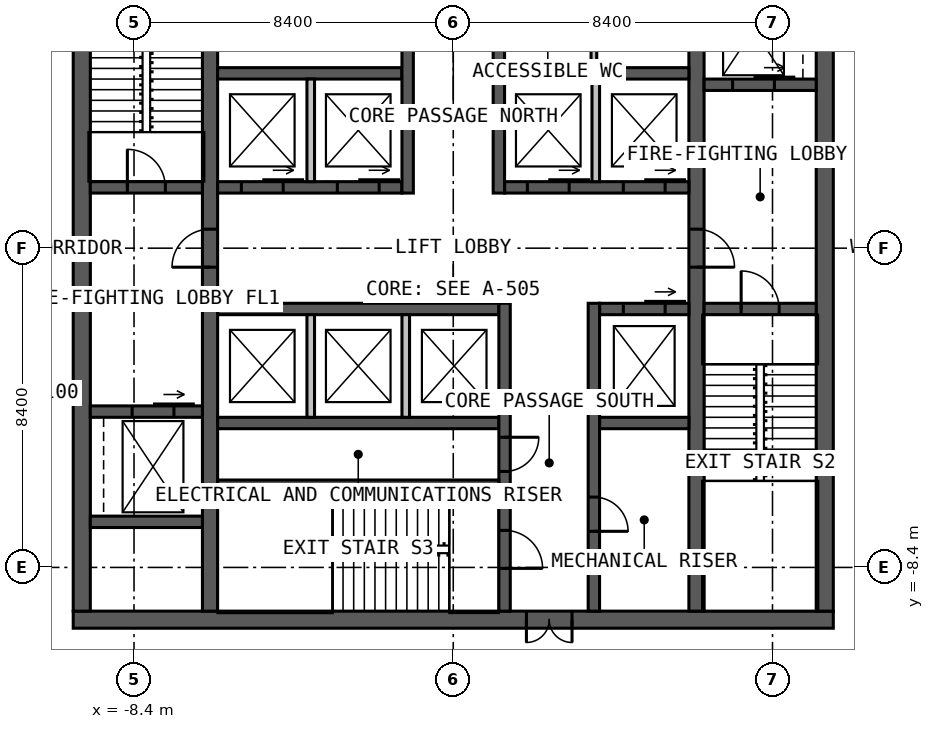
"""IFC4 building model, lengths in metres.
Left out: names, types, materials, properties, quantities, classifications, styles, units other than length and angle.
Written with IfcOpenShell. Run it as: python <this file> out.ifc"""

import sys

from ifc_helpers import new_model, si_unit, direction, frame, frame_2d, origin, place, context, subcontext, project, spatial, rectangle, extrude, element, fill, save


model = new_model("IFC4")
c1 = context("Model", 3, precision=1e-05, world=origin(), true_north=direction((0.0, 1.0)))
c2 = subcontext(c1, "Body", "Model", "MODEL_VIEW")
j1 = project(units=[si_unit("LENGTHUNIT", "METRE"), si_unit("PLANEANGLEUNIT", "RADIAN")], contexts=[c1])
p1 = place(None, origin())
s1 = spatial("IfcSite", under=j1, at=p1, CompositionType="ELEMENT")
p2 = place(p1, origin())
s2 = spatial("IfcBuilding", under=s1, at=p2, CompositionType="ELEMENT")
p3 = place(p2, frame((0.0, 0.0, 175.0)))
s3 = spatial("IfcBuildingStorey", under=s2, at=p3, CompositionType="ELEMENT", Elevation=175.0)
p4 = place(p3, frame((10.0, -9.775, 0.0), z_axis=(0.0, 0.0, 1.0), x_axis=(-1.0, 0.0, 0.0)))
e1 = element("IfcWall", 1, at=p4, inside=s3, PredefinedType="SOLIDWALL", context=c2, shape_type="SweptSolid", body=[
    extrude(rectangle(XDim=20.0, YDim=0.45, at=frame_2d((10.0, 0.0))), origin(), (0.0, 0.0, 1.0), 4.0),
])
p5 = place(p4, frame((6.875, 0.0, 0.0)))
e2 = element("IfcOpeningElement", 2, at=p5, cuts=e1, PredefinedType="OPENING", context=c2, shape_type="SweptSolid", body=[
    extrude(rectangle(XDim=1.2, YDim=2.2, at=frame_2d((0.6, 1.1))), frame((0.0, 0.235, 0.0), z_axis=(0.0, -1.0, 0.0), x_axis=(1.0, 0.0, 0.0)), (0.0, 0.0, 1.0), 0.47),
])
for number, where, z_axis, x_axis in (
    (3, (9.775, -9.55, 0.0), (0.0, 0.0, 1.0), (0.0, 1.0, 0.0)),
    (4, (-9.775, 9.55, 0.0), (0.0, 0.0, 1.0), (0.0, -1.0, 0.0)),
):
    element("IfcWall", number, at=place(p3, frame(where, z_axis=z_axis, x_axis=x_axis)), inside=s3, PredefinedType="SOLIDWALL", context=c2, shape_type="SweptSolid", body=[
        extrude(rectangle(XDim=19.1, YDim=0.45, at=frame_2d((9.55, 0.0))), origin(), (0.0, 0.0, 1.0), 4.0),
    ])
p6 = place(p3, frame((-6.4, -9.55, 0.0), z_axis=(0.0, 0.0, 1.0), x_axis=(0.0, 1.0, 0.0)))
e5 = element("IfcWall", 5, at=p6, inside=s3, PredefinedType="SOLIDWALL", context=c2, shape_type="SweptSolid", body=[
    extrude(rectangle(XDim=19.1, YDim=0.4, at=frame_2d((9.55, 0.0))), origin(), (0.0, 0.0, 1.0), 4.0),
])
p7 = place(p6, frame((9.05, 0.0, 0.0)))
e6 = element("IfcOpeningElement", 6, at=p7, cuts=e5, PredefinedType="OPENING", context=c2, shape_type="SweptSolid", body=[
    extrude(rectangle(XDim=1.0, YDim=2.2, at=frame_2d((0.5, 1.1))), frame((0.0, 0.21, 0.0), z_axis=(0.0, -1.0, 0.0), x_axis=(1.0, 0.0, 0.0)), (0.0, 0.0, 1.0), 0.42),
])
p8 = place(p3, frame((6.4, 9.55, 0.0), z_axis=(0.0, 0.0, 1.0), x_axis=(0.0, -1.0, 0.0)))
e7 = element("IfcWall", 7, at=p8, inside=s3, PredefinedType="SOLIDWALL", context=c2, shape_type="SweptSolid", body=[
    extrude(rectangle(XDim=19.1, YDim=0.4, at=frame_2d((9.55, 0.0))), origin(), (0.0, 0.0, 1.0), 4.0),
])
p9 = place(p8, frame((9.05, 0.0, 0.0)))
e8 = element("IfcOpeningElement", 8, at=p9, cuts=e7, PredefinedType="OPENING", context=c2, shape_type="SweptSolid", body=[
    extrude(rectangle(XDim=1.0, YDim=2.2, at=frame_2d((0.5, 1.1))), frame((0.0, 0.21, 0.0), z_axis=(0.0, -1.0, 0.0), x_axis=(1.0, 0.0, 0.0)), (0.0, 0.0, 1.0), 0.42),
])
p10 = place(p3, frame((-6.2, 1.6, 0.0), z_axis=(0.0, 0.0, 1.0), x_axis=(1.0, 0.0, 0.0)))
e9 = element("IfcWall", 9, at=p10, inside=s3, PredefinedType="SOLIDWALL", context=c2, shape_type="SweptSolid", body=[
    extrude(rectangle(XDim=4.85, YDim=0.3, at=frame_2d((2.425, 0.0))), origin(), (0.0, 0.0, 1.0), 4.0),
])
p11 = place(p10, frame((0.625, 0.0, 0.0)))
e10 = element("IfcOpeningElement", 10, at=p11, cuts=e9, PredefinedType="OPENING", context=c2, shape_type="SweptSolid", body=[
    extrude(rectangle(XDim=1.1, YDim=2.2, at=frame_2d((0.55, 1.1))), frame((0.0, 0.16, 0.0), z_axis=(0.0, -1.0, 0.0), x_axis=(1.0, 0.0, 0.0)), (0.0, 0.0, 1.0), 0.32),
])
p12 = place(p10, frame((3.15, 0.0, 0.0)))
e11 = element("IfcOpeningElement", 11, at=p12, cuts=e9, PredefinedType="OPENING", context=c2, shape_type="SweptSolid", body=[
    extrude(rectangle(XDim=1.1, YDim=2.2, at=frame_2d((0.55, 1.1))), frame((0.0, 0.16, 0.0), z_axis=(0.0, -1.0, 0.0), x_axis=(1.0, 0.0, 0.0)), (0.0, 0.0, 1.0), 0.32),
])
p13 = place(p3, frame((1.35, 1.6, 0.0), z_axis=(0.0, 0.0, 1.0), x_axis=(1.0, 0.0, 0.0)))
e12 = element("IfcWall", 12, at=p13, inside=s3, PredefinedType="SOLIDWALL", context=c2, shape_type="SweptSolid", body=[
    extrude(rectangle(XDim=4.85, YDim=0.3, at=frame_2d((2.425, 0.0))), origin(), (0.0, 0.0, 1.0), 4.0),
])
p14 = place(p13, frame((0.6, 0.0, 0.0)))
e13 = element("IfcOpeningElement", 13, at=p14, cuts=e12, PredefinedType="OPENING", context=c2, shape_type="SweptSolid", body=[
    extrude(rectangle(XDim=1.1, YDim=2.2, at=frame_2d((0.55, 1.1))), frame((0.0, 0.16, 0.0), z_axis=(0.0, -1.0, 0.0), x_axis=(1.0, 0.0, 0.0)), (0.0, 0.0, 1.0), 0.32),
])
p15 = place(p13, frame((3.125, 0.0, 0.0)))
e14 = element("IfcOpeningElement", 14, at=p15, cuts=e12, PredefinedType="OPENING", context=c2, shape_type="SweptSolid", body=[
    extrude(rectangle(XDim=1.1, YDim=2.2, at=frame_2d((0.55, 1.1))), frame((0.0, 0.16, 0.0), z_axis=(0.0, -1.0, 0.0), x_axis=(1.0, 0.0, 0.0)), (0.0, 0.0, 1.0), 0.32),
])
for number, where, z_axis, x_axis in (
    (15, (-6.2, 4.6, 0.0), (0.0, 0.0, 1.0), (1.0, 0.0, 0.0)),
    (16, (1.35, 4.6, 0.0), (0.0, 0.0, 1.0), (1.0, 0.0, 0.0)),
):
    element("IfcWall", number, at=place(p3, frame(where, z_axis=z_axis, x_axis=x_axis)), inside=s3, PredefinedType="SOLIDWALL", context=c2, shape_type="SweptSolid", body=[
        extrude(rectangle(XDim=4.85, YDim=0.3, at=frame_2d((2.425, 0.0))), origin(), (0.0, 0.0, 1.0), 4.0),
    ])
p16 = place(p3, frame((-1.2, 1.45, 0.0), z_axis=(0.0, 0.0, 1.0), x_axis=(0.0, 1.0, 0.0)))
e17 = element("IfcWall", 17, at=p16, inside=s3, PredefinedType="SOLIDWALL", context=c2, shape_type="SweptSolid", body=[
    extrude(rectangle(XDim=8.1, YDim=0.3, at=frame_2d((4.05, 0.0))), origin(), (0.0, 0.0, 1.0), 4.0),
])
p17 = place(p16, frame((5.05, 0.0, 0.0)))
e18 = element("IfcOpeningElement", 18, at=p17, cuts=e17, PredefinedType="OPENING", context=c2, shape_type="SweptSolid", body=[
    extrude(rectangle(XDim=1.0, YDim=2.2, at=frame_2d((0.5, 1.1))), frame((0.0, 0.16, 0.0), z_axis=(0.0, -1.0, 0.0), x_axis=(1.0, 0.0, 0.0)), (0.0, 0.0, 1.0), 0.32),
])
p18 = place(p3, frame((1.2, 1.45, 0.0), z_axis=(0.0, 0.0, 1.0), x_axis=(0.0, 1.0, 0.0)))
e19 = element("IfcWall", 19, at=p18, inside=s3, PredefinedType="SOLIDWALL", context=c2, shape_type="SweptSolid", body=[
    extrude(rectangle(XDim=8.1, YDim=0.3, at=frame_2d((4.05, 0.0))), origin(), (0.0, 0.0, 1.0), 4.0),
])
p19 = place(p18, frame((3.8, 0.0, 0.0)))
e20 = element("IfcOpeningElement", 20, at=p19, cuts=e19, PredefinedType="OPENING", context=c2, shape_type="SweptSolid", body=[
    extrude(rectangle(XDim=1.0, YDim=2.2, at=frame_2d((0.5, 1.1))), frame((0.0, 0.16, 0.0), z_axis=(0.0, -1.0, 0.0), x_axis=(1.0, 0.0, 0.0)), (0.0, 0.0, 1.0), 0.32),
])
p20 = place(p18, frame((6.15, 0.0, 0.0)))
e21 = element("IfcOpeningElement", 21, at=p20, cuts=e19, PredefinedType="OPENING", context=c2, shape_type="SweptSolid", body=[
    extrude(rectangle(XDim=1.0, YDim=2.2, at=frame_2d((0.5, 1.1))), frame((0.0, 0.16, 0.0), z_axis=(0.0, -1.0, 0.0), x_axis=(1.0, 0.0, 0.0)), (0.0, 0.0, 1.0), 0.32),
])
p21 = place(p3, frame((-6.2, -1.6, 0.0), z_axis=(0.0, 0.0, 1.0), x_axis=(1.0, 0.0, 0.0)))
e22 = element("IfcWall", 22, at=p21, inside=s3, PredefinedType="SOLIDWALL", context=c2, shape_type="SweptSolid", body=[
    extrude(rectangle(XDim=7.4, YDim=0.3, at=frame_2d((3.7, 0.0))), origin(), (0.0, 0.0, 1.0), 4.0),
])
p22 = place(p3, frame((3.85, -1.6, 0.0), z_axis=(0.0, 0.0, 1.0), x_axis=(1.0, 0.0, 0.0)))
e23 = element("IfcWall", 23, at=p22, inside=s3, PredefinedType="SOLIDWALL", context=c2, shape_type="SweptSolid", body=[
    extrude(rectangle(XDim=2.35, YDim=0.3, at=frame_2d((1.175, 0.0))), origin(), (0.0, 0.0, 1.0), 4.0),
])
p23 = place(p22, frame((0.625, 0.0, 0.0)))
e24 = element("IfcOpeningElement", 24, at=p23, cuts=e23, PredefinedType="OPENING", context=c2, shape_type="SweptSolid", body=[
    extrude(rectangle(XDim=1.1, YDim=2.2, at=frame_2d((0.55, 1.1))), frame((0.0, 0.16, 0.0), z_axis=(0.0, -1.0, 0.0), x_axis=(1.0, 0.0, 0.0)), (0.0, 0.0, 1.0), 0.32),
])
p24 = place(p3, frame((-6.2, -4.6, 0.0), z_axis=(0.0, 0.0, 1.0), x_axis=(1.0, 0.0, 0.0)))
e25 = element("IfcWall", 25, at=p24, inside=s3, PredefinedType="SOLIDWALL", context=c2, shape_type="SweptSolid", body=[
    extrude(rectangle(XDim=7.4, YDim=0.3, at=frame_2d((3.7, 0.0))), origin(), (0.0, 0.0, 1.0), 4.0),
])
p25 = place(p3, frame((3.85, -4.6, 0.0), z_axis=(0.0, 0.0, 1.0), x_axis=(1.0, 0.0, 0.0)))
e26 = element("IfcWall", 26, at=p25, inside=s3, PredefinedType="SOLIDWALL", context=c2, shape_type="SweptSolid", body=[
    extrude(rectangle(XDim=2.35, YDim=0.3, at=frame_2d((1.175, 0.0))), origin(), (0.0, 0.0, 1.0), 4.0),
])
p26 = place(p3, frame((1.35, -1.45, 0.0), z_axis=(0.0, 0.0, 1.0), x_axis=(0.0, -1.0, 0.0)))
e27 = element("IfcWall", 27, at=p26, inside=s3, PredefinedType="SOLIDWALL", context=c2, shape_type="SweptSolid", body=[
    extrude(rectangle(XDim=8.1, YDim=0.3, at=frame_2d((4.05, 0.0))), origin(), (0.0, 0.0, 1.0), 4.0),
])
p27 = place(p26, frame((5.975, 0.0, 0.0)))
e28 = element("IfcOpeningElement", 28, at=p27, cuts=e27, PredefinedType="OPENING", context=c2, shape_type="SweptSolid", body=[
    extrude(rectangle(XDim=1.0, YDim=2.2, at=frame_2d((0.5, 1.1))), frame((0.0, 0.16, 0.0), z_axis=(0.0, -1.0, 0.0), x_axis=(1.0, 0.0, 0.0)), (0.0, 0.0, 1.0), 0.32),
])
p28 = place(p26, frame((3.525, 0.0, 0.0)))
e29 = element("IfcOpeningElement", 29, at=p28, cuts=e27, PredefinedType="OPENING", context=c2, shape_type="SweptSolid", body=[
    extrude(rectangle(XDim=0.9, YDim=2.2, at=frame_2d((0.45, 1.1))), frame((0.0, 0.16, 0.0), z_axis=(0.0, -1.0, 0.0), x_axis=(1.0, 0.0, 0.0)), (0.0, 0.0, 1.0), 0.32),
])
p29 = place(p3, frame((3.7, -1.45, 0.0), z_axis=(0.0, 0.0, 1.0), x_axis=(0.0, -1.0, 0.0)))
e30 = element("IfcWall", 30, at=p29, inside=s3, PredefinedType="SOLIDWALL", context=c2, shape_type="SweptSolid", body=[
    extrude(rectangle(XDim=8.1, YDim=0.3, at=frame_2d((4.05, 0.0))), origin(), (0.0, 0.0, 1.0), 4.0),
])
p30 = place(p29, frame((5.1, 0.0, 0.0)))
e31 = element("IfcOpeningElement", 31, at=p30, cuts=e30, PredefinedType="OPENING", context=c2, shape_type="SweptSolid", body=[
    extrude(rectangle(XDim=0.9, YDim=2.2, at=frame_2d((0.45, 1.1))), frame((0.0, 0.16, 0.0), z_axis=(0.0, -1.0, 0.0), x_axis=(1.0, 0.0, 0.0)), (0.0, 0.0, 1.0), 0.32),
])
p31 = place(p3, frame((-6.2, -6.2, 0.0), z_axis=(0.0, 0.0, 1.0), x_axis=(1.0, 0.0, 0.0)))
e32 = element("IfcWall", 32, at=p31, inside=s3, PredefinedType="SOLIDWALL", context=c2, shape_type="SweptSolid", body=[
    extrude(rectangle(XDim=7.4, YDim=0.2, at=frame_2d((3.7, 0.0))), origin(), (0.0, 0.0, 1.0), 4.0),
])
p32 = place(p3, frame((-9.55, 1.6, 0.0), z_axis=(0.0, 0.0, 1.0), x_axis=(1.0, 0.0, 0.0)))
e33 = element("IfcWall", 33, at=p32, inside=s3, PredefinedType="SOLIDWALL", context=c2, shape_type="SweptSolid", body=[
    extrude(rectangle(XDim=2.95, YDim=0.3, at=frame_2d((1.475, 0.0))), origin(), (0.0, 0.0, 1.0), 4.0),
])
p33 = place(p32, frame((0.975, 0.0, 0.0)))
e34 = element("IfcOpeningElement", 34, at=p33, cuts=e33, PredefinedType="OPENING", context=c2, shape_type="SweptSolid", body=[
    extrude(rectangle(XDim=1.0, YDim=2.2, at=frame_2d((0.5, 1.1))), frame((0.0, 0.16, 0.0), z_axis=(0.0, -1.0, 0.0), x_axis=(1.0, 0.0, 0.0)), (0.0, 0.0, 1.0), 0.32),
])
p34 = place(p3, frame((6.6, -1.6, 0.0), z_axis=(0.0, 0.0, 1.0), x_axis=(1.0, 0.0, 0.0)))
e35 = element("IfcWall", 35, at=p34, inside=s3, PredefinedType="SOLIDWALL", context=c2, shape_type="SweptSolid", body=[
    extrude(rectangle(XDim=2.95, YDim=0.3, at=frame_2d((1.475, 0.0))), origin(), (0.0, 0.0, 1.0), 4.0),
])
p35 = place(p34, frame((0.975, 0.0, 0.0)))
e36 = element("IfcOpeningElement", 36, at=p35, cuts=e35, PredefinedType="OPENING", context=c2, shape_type="SweptSolid", body=[
    extrude(rectangle(XDim=1.0, YDim=2.2, at=frame_2d((0.5, 1.1))), frame((0.0, 0.16, 0.0), z_axis=(0.0, -1.0, 0.0), x_axis=(1.0, 0.0, 0.0)), (0.0, 0.0, 1.0), 0.32),
])
p36 = place(p3, frame((-9.55, -4.3, 0.0), z_axis=(0.0, 0.0, 1.0), x_axis=(1.0, 0.0, 0.0)))
e37 = element("IfcWall", 37, at=p36, inside=s3, PredefinedType="SOLIDWALL", context=c2, shape_type="SweptSolid", body=[
    extrude(rectangle(XDim=2.95, YDim=0.3, at=frame_2d((1.475, 0.0))), origin(), (0.0, 0.0, 1.0), 4.0),
])
p37 = place(p36, frame((1.1, 0.0, 0.0)))
e38 = element("IfcOpeningElement", 38, at=p37, cuts=e37, PredefinedType="OPENING", context=c2, shape_type="SweptSolid", body=[
    extrude(rectangle(XDim=1.1, YDim=2.2, at=frame_2d((0.55, 1.1))), frame((0.0, 0.16, 0.0), z_axis=(0.0, -1.0, 0.0), x_axis=(1.0, 0.0, 0.0)), (0.0, 0.0, 1.0), 0.32),
])
p38 = place(p3, frame((6.6, 4.3, 0.0), z_axis=(0.0, 0.0, 1.0), x_axis=(1.0, 0.0, 0.0)))
e39 = element("IfcWall", 39, at=p38, inside=s3, PredefinedType="SOLIDWALL", context=c2, shape_type="SweptSolid", body=[
    extrude(rectangle(XDim=2.95, YDim=0.3, at=frame_2d((1.475, 0.0))), origin(), (0.0, 0.0, 1.0), 4.0),
])
p39 = place(p38, frame((0.75, 0.0, 0.0)))
e40 = element("IfcOpeningElement", 40, at=p39, cuts=e39, PredefinedType="OPENING", context=c2, shape_type="SweptSolid", body=[
    extrude(rectangle(XDim=1.1, YDim=2.2, at=frame_2d((0.55, 1.1))), frame((0.0, 0.16, 0.0), z_axis=(0.0, -1.0, 0.0), x_axis=(1.0, 0.0, 0.0)), (0.0, 0.0, 1.0), 0.32),
])
p40 = place(p3, frame((-9.55, -7.2, 0.0), z_axis=(0.0, 0.0, 1.0), x_axis=(1.0, 0.0, 0.0)))
e41 = element("IfcWall", 41, at=p40, inside=s3, PredefinedType="SOLIDWALL", context=c2, shape_type="SweptSolid", body=[
    extrude(rectangle(XDim=2.95, YDim=0.3, at=frame_2d((1.475, 0.0))), origin(), (0.0, 0.0, 1.0), 4.0),
])
for number, where, z_axis, x_axis in (
    (42, (-3.75, 1.75, 0.0), (0.0, 0.0, 1.0), (0.0, 1.0, 0.0)),
    (43, (3.75, 1.75, 0.0), (0.0, 0.0, 1.0), (0.0, 1.0, 0.0)),
    (44, (-3.75, -1.75, 0.0), (0.0, 0.0, 1.0), (0.0, -1.0, 0.0)),
    (45, (-1.25, -1.75, 0.0), (0.0, 0.0, 1.0), (0.0, -1.0, 0.0)),
):
    element("IfcWall", number, at=place(p3, frame(where, z_axis=z_axis, x_axis=x_axis)), inside=s3, PredefinedType="SOLIDWALL", context=c2, shape_type="SweptSolid", body=[
        extrude(rectangle(XDim=2.7, YDim=0.2, at=frame_2d((1.35, 0.0))), origin(), (0.0, 0.0, 1.0), 3.75),
    ])
p41 = place(p3, frame((3.7, 4.75, 0.0), z_axis=(0.0, 0.0, 1.0), x_axis=(0.0, 1.0, 0.0)))
e46 = element("IfcWall", 46, at=p41, inside=s3, PredefinedType="PARTITIONING", context=c2, shape_type="SweptSolid", body=[
    extrude(rectangle(XDim=1.975, YDim=0.15, at=frame_2d((0.988, 0.0))), origin(), (0.0, 0.0, 1.0), 3.75),
])
p42 = place(p5, origin())
e47 = element("IfcDoor", 47, at=p42, inside=s3, OperationType="DOUBLE_DOOR_SINGLE_SWING", PredefinedType="DOOR", context=c2, shape_type="SweptSolid", body=[
    extrude(rectangle(XDim=1.2, YDim=2.2, at=frame_2d((0.6, 1.1))), frame((0.0, 0.025, 0.0), z_axis=(0.0, -1.0, 0.0), x_axis=(1.0, 0.0, 0.0)), (0.0, 0.0, 1.0), 0.05),
])
fill(e2, e47)
p43 = place(p7, origin())
e48 = element("IfcDoor", 48, at=p43, inside=s3, OperationType="SINGLE_SWING_LEFT", PredefinedType="DOOR", context=c2, shape_type="SweptSolid", body=[
    extrude(rectangle(XDim=1.0, YDim=2.2, at=frame_2d((0.5, 1.1))), frame((0.0, 0.025, 0.0), z_axis=(0.0, -1.0, 0.0), x_axis=(1.0, 0.0, 0.0)), (0.0, 0.0, 1.0), 0.05),
])
fill(e6, e48)
p44 = place(p9, origin())
e49 = element("IfcDoor", 49, at=p44, inside=s3, OperationType="SINGLE_SWING_RIGHT", PredefinedType="DOOR", context=c2, shape_type="SweptSolid", body=[
    extrude(rectangle(XDim=1.0, YDim=2.2, at=frame_2d((0.5, 1.1))), frame((0.0, 0.025, 0.0), z_axis=(0.0, -1.0, 0.0), x_axis=(1.0, 0.0, 0.0)), (0.0, 0.0, 1.0), 0.05),
])
fill(e8, e49)
p45 = place(p33, origin())
e50 = element("IfcDoor", 50, at=p45, inside=s3, OperationType="SINGLE_SWING_LEFT", PredefinedType="DOOR", context=c2, shape_type="SweptSolid", body=[
    extrude(rectangle(XDim=1.0, YDim=2.2, at=frame_2d((0.5, 1.1))), frame((0.0, 0.025, 0.0), z_axis=(0.0, -1.0, 0.0), x_axis=(1.0, 0.0, 0.0)), (0.0, 0.0, 1.0), 0.05),
])
fill(e34, e50)
p46 = place(p35, origin())
e51 = element("IfcDoor", 51, at=p46, inside=s3, OperationType="SINGLE_SWING_LEFT", PredefinedType="DOOR", context=c2, shape_type="SweptSolid", body=[
    extrude(rectangle(XDim=1.0, YDim=2.2, at=frame_2d((0.5, 1.1))), frame((0.0, 0.025, 0.0), z_axis=(0.0, -1.0, 0.0), x_axis=(1.0, 0.0, 0.0)), (0.0, 0.0, 1.0), 0.05),
])
fill(e36, e51)
p47 = place(p27, origin())
e52 = element("IfcDoor", 52, at=p47, inside=s3, OperationType="SINGLE_SWING_RIGHT", PredefinedType="DOOR", context=c2, shape_type="SweptSolid", body=[
    extrude(rectangle(XDim=1.0, YDim=2.2, at=frame_2d((0.5, 1.1))), frame((0.0, 0.025, 0.0), z_axis=(0.0, -1.0, 0.0), x_axis=(1.0, 0.0, 0.0)), (0.0, 0.0, 1.0), 0.05),
])
fill(e28, e52)
p48 = place(p28, origin())
e53 = element("IfcDoor", 53, at=p48, inside=s3, OperationType="SINGLE_SWING_LEFT", PredefinedType="DOOR", context=c2, shape_type="SweptSolid", body=[
    extrude(rectangle(XDim=0.9, YDim=2.2, at=frame_2d((0.45, 1.1))), frame((0.0, 0.025, 0.0), z_axis=(0.0, -1.0, 0.0), x_axis=(1.0, 0.0, 0.0)), (0.0, 0.0, 1.0), 0.05),
])
fill(e29, e53)
p49 = place(p30, origin())
e54 = element("IfcDoor", 54, at=p49, inside=s3, OperationType="SINGLE_SWING_RIGHT", PredefinedType="DOOR", context=c2, shape_type="SweptSolid", body=[
    extrude(rectangle(XDim=0.9, YDim=2.2, at=frame_2d((0.45, 1.1))), frame((0.0, 0.025, 0.0), z_axis=(0.0, -1.0, 0.0), x_axis=(1.0, 0.0, 0.0)), (0.0, 0.0, 1.0), 0.05),
])
fill(e31, e54)
p50 = place(p11, origin())
e55 = element("IfcDoor", 55, at=p50, inside=s3, OperationType="SLIDING_TO_LEFT", PredefinedType="DOOR", context=c2, shape_type="SweptSolid", body=[
    extrude(rectangle(XDim=1.1, YDim=2.2, at=frame_2d((0.55, 1.1))), frame((0.0, 0.025, 0.0), z_axis=(0.0, -1.0, 0.0), x_axis=(1.0, 0.0, 0.0)), (0.0, 0.0, 1.0), 0.05),
])
fill(e10, e55)
p51 = place(p12, origin())
e56 = element("IfcDoor", 56, at=p51, inside=s3, OperationType="SLIDING_TO_LEFT", PredefinedType="DOOR", context=c2, shape_type="SweptSolid", body=[
    extrude(rectangle(XDim=1.1, YDim=2.2, at=frame_2d((0.55, 1.1))), frame((0.0, 0.025, 0.0), z_axis=(0.0, -1.0, 0.0), x_axis=(1.0, 0.0, 0.0)), (0.0, 0.0, 1.0), 0.05),
])
fill(e11, e56)
p52 = place(p14, origin())
e57 = element("IfcDoor", 57, at=p52, inside=s3, OperationType="SLIDING_TO_LEFT", PredefinedType="DOOR", context=c2, shape_type="SweptSolid", body=[
    extrude(rectangle(XDim=1.1, YDim=2.2, at=frame_2d((0.55, 1.1))), frame((0.0, 0.025, 0.0), z_axis=(0.0, -1.0, 0.0), x_axis=(1.0, 0.0, 0.0)), (0.0, 0.0, 1.0), 0.05),
])
fill(e13, e57)
p53 = place(p15, origin())
e58 = element("IfcDoor", 58, at=p53, inside=s3, OperationType="SLIDING_TO_LEFT", PredefinedType="DOOR", context=c2, shape_type="SweptSolid", body=[
    extrude(rectangle(XDim=1.1, YDim=2.2, at=frame_2d((0.55, 1.1))), frame((0.0, 0.025, 0.0), z_axis=(0.0, -1.0, 0.0), x_axis=(1.0, 0.0, 0.0)), (0.0, 0.0, 1.0), 0.05),
])
fill(e14, e58)
p54 = place(p23, origin())
e59 = element("IfcDoor", 59, at=p54, inside=s3, OperationType="SLIDING_TO_LEFT", PredefinedType="DOOR", context=c2, shape_type="SweptSolid", body=[
    extrude(rectangle(XDim=1.1, YDim=2.2, at=frame_2d((0.55, 1.1))), frame((0.0, 0.025, 0.0), z_axis=(0.0, -1.0, 0.0), x_axis=(1.0, 0.0, 0.0)), (0.0, 0.0, 1.0), 0.05),
])
fill(e24, e59)
p55 = place(p37, origin())
e60 = element("IfcDoor", 60, at=p55, inside=s3, OperationType="SLIDING_TO_LEFT", PredefinedType="DOOR", context=c2, shape_type="SweptSolid", body=[
    extrude(rectangle(XDim=1.1, YDim=2.2, at=frame_2d((0.55, 1.1))), frame((0.0, 0.025, 0.0), z_axis=(0.0, -1.0, 0.0), x_axis=(1.0, 0.0, 0.0)), (0.0, 0.0, 1.0), 0.05),
])
fill(e38, e60)
p56 = place(p39, origin())
e61 = element("IfcDoor", 61, at=p56, inside=s3, OperationType="SLIDING_TO_LEFT", PredefinedType="DOOR", context=c2, shape_type="SweptSolid", body=[
    extrude(rectangle(XDim=1.1, YDim=2.2, at=frame_2d((0.55, 1.1))), frame((0.0, 0.025, 0.0), z_axis=(0.0, -1.0, 0.0), x_axis=(1.0, 0.0, 0.0)), (0.0, 0.0, 1.0), 0.05),
])
fill(e40, e61)
save(model, sys.argv[1])
